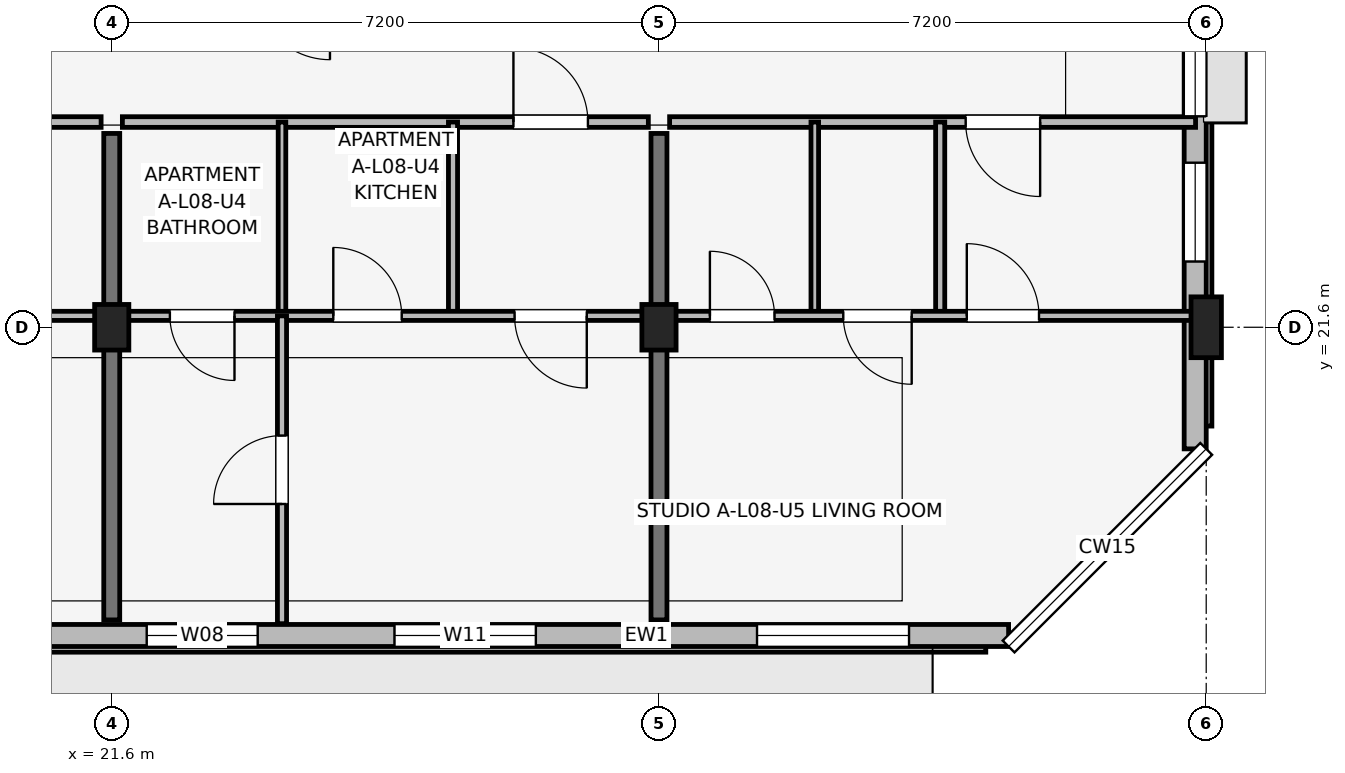
"""IFC4 building model, lengths in metres.
Left out: names, types, materials, properties, quantities, classifications, styles, units other than length and angle.
Written with IfcOpenShell. Run it as: python <this file> out.ifc"""

import sys

from ifc_helpers import new_model, si_unit, direction, frame, frame_2d, origin, origin_2d, place, context, subcontext, project, spatial, rectangle, extrude, element, fill, save


model = new_model("IFC4")
c1 = context("Model", 3, precision=1e-05, world=origin(), true_north=direction((0.0, 1.0)))
c2 = subcontext(c1, "Body", "Model", "MODEL_VIEW")
j1 = project(units=[si_unit("LENGTHUNIT", "METRE"), si_unit("PLANEANGLEUNIT", "RADIAN")], contexts=[c1])
p1 = place(None, origin())
s1 = spatial("IfcSite", under=j1, at=p1, CompositionType="ELEMENT")
p2 = place(p1, origin())
s2 = spatial("IfcBuilding", under=s1, at=p2, CompositionType="ELEMENT")
p3 = place(p2, frame((0.0, 0.0, 27.6)))
s3 = spatial("IfcBuildingStorey", under=s2, at=p3, CompositionType="ELEMENT", Elevation=27.6)
for number, where, z_axis, x_axis in (
    (1, (21.6, 21.6, 0.0), (0.0, 0.0, 1.0), (1.0, 0.0, 0.0)),
    (2, (28.8, 21.6, 0.0), (0.0, 0.0, 1.0), (1.0, 0.0, 0.0)),
):
    element("IfcColumn", number, at=place(p3, frame(where, z_axis=z_axis, x_axis=x_axis)), inside=s3, PredefinedType="COLUMN", context=c2, shape_type="SweptSolid", body=[
        extrude(rectangle(XDim=0.45, YDim=0.6, at=origin_2d()), origin(), (0.0, 0.0, 1.0), 3.15),
    ])
p4 = place(p3, frame((36.0, 21.6, 0.0), z_axis=(0.0, 0.0, 1.0), x_axis=(1.0, 0.0, 0.0)))
e3 = element("IfcColumn", 3, at=p4, inside=s3, PredefinedType="COLUMN", context=c2, shape_type="SweptSolid", body=[
    extrude(rectangle(XDim=0.4, YDim=0.8, at=origin_2d()), origin(), (0.0, 0.0, 1.0), 3.15),
])
for number, where, z_axis, x_axis in (
    (4, (21.6, 17.75, 0.0), (0.0, 0.0, 1.0), (0.0, 1.0, 0.0)),
    (5, (28.8, 17.75, 0.0), (0.0, 0.0, 1.0), (0.0, 1.0, 0.0)),
):
    element("IfcWall", number, at=place(p3, frame(where, z_axis=z_axis, x_axis=x_axis)), inside=s3, PredefinedType="SHEAR", context=c2, shape_type="SweptSolid", body=[
        extrude(rectangle(XDim=6.4, YDim=0.21, at=frame_2d((3.2, 0.0))), origin(), (0.0, 0.0, 1.0), 3.15),
    ])
p5 = place(p3, frame((2.6, 17.545, 0.0), z_axis=(0.0, 0.0, 1.0), x_axis=(1.0, 0.0, 0.0)))
e6 = element("IfcWall", 6, at=p5, inside=s3, PredefinedType="SOLIDWALL", context=c2, shape_type="SweptSolid", body=[
    extrude(rectangle(XDim=30.8, YDim=0.29, at=frame_2d((15.4, 0.0))), origin(), (0.0, 0.0, 1.0), 2.43),
])
p6 = place(p5, frame((17.95, 0.0, 0.0), z_axis=(0.0, 0.0, 1.0), x_axis=(-1.0, 0.0, 0.0)))
e7 = element("IfcOpeningElement", 7, at=p6, cuts=e6, PredefinedType="OPENING", context=c2, shape_type="SweptSolid", body=[
    extrude(rectangle(XDim=1.9, YDim=2.2, at=frame_2d((0.95, 1.1))), frame((0.0, 0.155, 0.0), z_axis=(0.0, -1.0, 0.0), x_axis=(1.0, 0.0, 0.0)), (0.0, 0.0, 1.0), 0.31),
])
p7 = place(p5, frame((0.485, 0.0, 0.67)))
e8 = element("IfcOpeningElement", 8, at=p7, cuts=e6, PredefinedType="OPENING", context=c2, shape_type="SweptSolid", body=[
    extrude(rectangle(XDim=2.0, YDim=1.65, at=frame_2d((1.0, 0.825))), frame((0.0, 0.155, 0.0), z_axis=(0.0, -1.0, 0.0), x_axis=(1.0, 0.0, 0.0)), (0.0, 0.0, 1.0), 0.31),
])
p8 = place(p5, frame((3.145, 0.0, 0.75)))
e9 = element("IfcOpeningElement", 9, at=p8, cuts=e6, PredefinedType="OPENING", context=c2, shape_type="SweptSolid", body=[
    extrude(rectangle(XDim=0.98, YDim=1.45, at=frame_2d((0.49, 0.725))), frame((0.0, 0.155, 0.0), z_axis=(0.0, -1.0, 0.0), x_axis=(1.0, 0.0, 0.0)), (0.0, 0.0, 1.0), 0.31),
])
p9 = place(p5, frame((5.115, 0.0, 0.75)))
e10 = element("IfcOpeningElement", 10, at=p9, cuts=e6, PredefinedType="OPENING", context=c2, shape_type="SweptSolid", body=[
    extrude(rectangle(XDim=1.1, YDim=1.5, at=frame_2d((0.55, 0.75))), frame((0.0, 0.155, 0.0), z_axis=(0.0, -1.0, 0.0), x_axis=(1.0, 0.0, 0.0)), (0.0, 0.0, 1.0), 0.31),
])
p10 = place(p5, frame((7.9, 0.0, 0.67)))
e11 = element("IfcOpeningElement", 11, at=p10, cuts=e6, PredefinedType="OPENING", context=c2, shape_type="SweptSolid", body=[
    extrude(rectangle(XDim=2.45, YDim=1.65, at=frame_2d((1.225, 0.825))), frame((0.0, 0.155, 0.0), z_axis=(0.0, -1.0, 0.0), x_axis=(1.0, 0.0, 0.0)), (0.0, 0.0, 1.0), 0.31),
])
p11 = place(p5, frame((12.32, 0.0, 0.75)))
e12 = element("IfcOpeningElement", 12, at=p11, cuts=e6, PredefinedType="OPENING", context=c2, shape_type="SweptSolid", body=[
    extrude(rectangle(XDim=1.34, YDim=1.55, at=frame_2d((0.67, 0.775))), frame((0.0, 0.155, 0.0), z_axis=(0.0, -1.0, 0.0), x_axis=(1.0, 0.0, 0.0)), (0.0, 0.0, 1.0), 0.31),
])
p12 = place(p5, frame((19.46, 0.0, 0.75)))
e13 = element("IfcOpeningElement", 13, at=p12, cuts=e6, PredefinedType="OPENING", context=c2, shape_type="SweptSolid", body=[
    extrude(rectangle(XDim=1.46, YDim=1.55, at=frame_2d((0.73, 0.775))), frame((0.0, 0.155, 0.0), z_axis=(0.0, -1.0, 0.0), x_axis=(1.0, 0.0, 0.0)), (0.0, 0.0, 1.0), 0.31),
])
p13 = place(p5, frame((22.72, 0.0, 0.7)))
e14 = element("IfcOpeningElement", 14, at=p13, cuts=e6, PredefinedType="OPENING", context=c2, shape_type="SweptSolid", body=[
    extrude(rectangle(XDim=1.86, YDim=1.6, at=frame_2d((0.93, 0.8))), frame((0.0, 0.155, 0.0), z_axis=(0.0, -1.0, 0.0), x_axis=(1.0, 0.0, 0.0)), (0.0, 0.0, 1.0), 0.31),
])
p14 = place(p5, frame((27.49, 0.0, 0.67)))
e15 = element("IfcOpeningElement", 15, at=p14, cuts=e6, PredefinedType="OPENING", context=c2, shape_type="SweptSolid", body=[
    extrude(rectangle(XDim=2.0, YDim=1.65, at=frame_2d((1.0, 0.825))), frame((0.0, 0.155, 0.0), z_axis=(0.0, -1.0, 0.0), x_axis=(1.0, 0.0, 0.0)), (0.0, 0.0, 1.0), 0.31),
])
p15 = place(p3, frame((35.855, 20.0, 0.0), z_axis=(0.0, 0.0, 1.0), x_axis=(0.0, 1.0, 0.0)))
e16 = element("IfcWall", 16, at=p15, inside=s3, PredefinedType="SOLIDWALL", context=c2, shape_type="SweptSolid", body=[
    extrude(rectangle(XDim=13.4, YDim=0.29, at=frame_2d((6.7, 0.0))), origin(), (0.0, 0.0, 1.0), 2.43),
])
p16 = place(p15, frame((4.375, 0.0, 1.05)))
e17 = element("IfcOpeningElement", 17, at=p16, cuts=e16, PredefinedType="OPENING", context=c2, shape_type="SweptSolid", body=[
    extrude(rectangle(XDim=1.65, YDim=1.15, at=frame_2d((0.825, 0.575))), frame((0.0, 0.155, 0.0), z_axis=(0.0, -1.0, 0.0), x_axis=(1.0, 0.0, 0.0)), (0.0, 0.0, 1.0), 0.31),
])
p17 = place(p15, frame((2.465, 0.0, 0.75)))
e18 = element("IfcOpeningElement", 18, at=p17, cuts=e16, PredefinedType="OPENING", context=c2, shape_type="SweptSolid", body=[
    extrude(rectangle(XDim=1.3, YDim=1.55, at=frame_2d((0.65, 0.775))), frame((0.0, 0.155, 0.0), z_axis=(0.0, -1.0, 0.0), x_axis=(1.0, 0.0, 0.0)), (0.0, 0.0, 1.0), 0.31),
])
p18 = place(p3, frame((14.54, 24.3, 0.0), z_axis=(0.0, 0.0, 1.0), x_axis=(1.0, 0.0, 0.0)))
e19 = element("IfcWall", 19, at=p18, inside=s3, PredefinedType="PARTITIONING", context=c2, shape_type="SweptSolid", body=[
    extrude(rectangle(XDim=6.92, YDim=0.14, at=frame_2d((3.46, 0.0))), origin(), (0.0, 0.0, 1.0), 2.38),
])
p19 = place(p18, frame((5.975, 0.0, 0.0), z_axis=(0.0, 0.0, 1.0), x_axis=(-1.0, 0.0, 0.0)))
e20 = element("IfcOpeningElement", 20, at=p19, cuts=e19, PredefinedType="OPENING", context=c2, shape_type="SweptSolid", body=[
    extrude(rectangle(XDim=0.98, YDim=2.1, at=frame_2d((0.49, 1.05))), frame((0.0, 0.08, 0.0), z_axis=(0.0, -1.0, 0.0), x_axis=(1.0, 0.0, 0.0)), (0.0, 0.0, 1.0), 0.16),
])
p20 = place(p3, frame((14.54, 21.75, 0.0), z_axis=(0.0, 0.0, 1.0), x_axis=(1.0, 0.0, 0.0)))
e21 = element("IfcWall", 21, at=p20, inside=s3, PredefinedType="PARTITIONING", context=c2, shape_type="SweptSolid", body=[
    extrude(rectangle(XDim=6.92, YDim=0.12, at=frame_2d((3.46, 0.0))), origin(), (0.0, 0.0, 1.0), 2.38),
])
p21 = place(p20, frame((0.625, 0.0, 0.0)))
e22 = element("IfcOpeningElement", 22, at=p21, cuts=e21, PredefinedType="OPENING", context=c2, shape_type="SweptSolid", body=[
    extrude(rectangle(XDim=0.85, YDim=2.08, at=frame_2d((0.425, 1.04))), frame((0.0, 0.07, 0.0), z_axis=(0.0, -1.0, 0.0), x_axis=(1.0, 0.0, 0.0)), (0.0, 0.0, 1.0), 0.14),
])
p22 = place(p20, frame((3.525, 0.0, 0.0), z_axis=(0.0, 0.0, 1.0), x_axis=(-1.0, 0.0, 0.0)))
e23 = element("IfcOpeningElement", 23, at=p22, cuts=e21, PredefinedType="OPENING", context=c2, shape_type="SweptSolid", body=[
    extrude(rectangle(XDim=0.9, YDim=2.08, at=frame_2d((0.45, 1.04))), frame((0.0, 0.07, 0.0), z_axis=(0.0, -1.0, 0.0), x_axis=(1.0, 0.0, 0.0)), (0.0, 0.0, 1.0), 0.14),
])
p23 = place(p20, frame((5.01, 0.0, 0.0)))
e24 = element("IfcOpeningElement", 24, at=p23, cuts=e21, PredefinedType="OPENING", context=c2, shape_type="SweptSolid", body=[
    extrude(rectangle(XDim=0.95, YDim=2.08, at=frame_2d((0.475, 1.04))), frame((0.0, 0.07, 0.0), z_axis=(0.0, -1.0, 0.0), x_axis=(1.0, 0.0, 0.0)), (0.0, 0.0, 1.0), 0.14),
])
p24 = place(p3, frame((21.74, 24.3, 0.0), z_axis=(0.0, 0.0, 1.0), x_axis=(1.0, 0.0, 0.0)))
e25 = element("IfcWall", 25, at=p24, inside=s3, PredefinedType="PARTITIONING", context=c2, shape_type="SweptSolid", body=[
    extrude(rectangle(XDim=6.92, YDim=0.14, at=frame_2d((3.46, 0.0))), origin(), (0.0, 0.0, 1.0), 2.38),
])
p25 = place(p24, frame((5.145, 0.0, 0.0)))
e26 = element("IfcOpeningElement", 26, at=p25, cuts=e25, PredefinedType="OPENING", context=c2, shape_type="SweptSolid", body=[
    extrude(rectangle(XDim=0.98, YDim=2.1, at=frame_2d((0.49, 1.05))), frame((0.0, 0.08, 0.0), z_axis=(0.0, -1.0, 0.0), x_axis=(1.0, 0.0, 0.0)), (0.0, 0.0, 1.0), 0.16),
])
p26 = place(p3, frame((23.84, 21.75, 0.0), z_axis=(0.0, 0.0, 1.0), x_axis=(0.0, 1.0, 0.0)))
e27 = element("IfcWall", 27, at=p26, inside=s3, PredefinedType="PARTITIONING", context=c2, shape_type="SweptSolid", body=[
    extrude(rectangle(XDim=2.55, YDim=0.1, at=frame_2d((1.275, 0.0))), origin(), (0.0, 0.0, 1.0), 2.38),
])
p27 = place(p3, frame((26.09, 21.75, 0.0), z_axis=(0.0, 0.0, 1.0), x_axis=(0.0, 1.0, 0.0)))
e28 = element("IfcWall", 28, at=p27, inside=s3, PredefinedType="PARTITIONING", context=c2, shape_type="SweptSolid", body=[
    extrude(rectangle(XDim=2.55, YDim=0.12, at=frame_2d((1.275, 0.0))), origin(), (0.0, 0.0, 1.0), 2.38),
])
p28 = place(p3, frame((21.74, 21.75, 0.0), z_axis=(0.0, 0.0, 1.0), x_axis=(1.0, 0.0, 0.0)))
e29 = element("IfcWall", 29, at=p28, inside=s3, PredefinedType="PARTITIONING", context=c2, shape_type="SweptSolid", body=[
    extrude(rectangle(XDim=6.92, YDim=0.12, at=frame_2d((3.46, 0.0))), origin(), (0.0, 0.0, 1.0), 2.38),
])
p29 = place(p28, frame((1.475, 0.0, 0.0), z_axis=(0.0, 0.0, 1.0), x_axis=(-1.0, 0.0, 0.0)))
e30 = element("IfcOpeningElement", 30, at=p29, cuts=e29, PredefinedType="OPENING", context=c2, shape_type="SweptSolid", body=[
    extrude(rectangle(XDim=0.85, YDim=2.08, at=frame_2d((0.425, 1.04))), frame((0.0, 0.07, 0.0), z_axis=(0.0, -1.0, 0.0), x_axis=(1.0, 0.0, 0.0)), (0.0, 0.0, 1.0), 0.14),
])
p30 = place(p28, frame((2.775, 0.0, 0.0)))
e31 = element("IfcOpeningElement", 31, at=p30, cuts=e29, PredefinedType="OPENING", context=c2, shape_type="SweptSolid", body=[
    extrude(rectangle(XDim=0.9, YDim=2.08, at=frame_2d((0.45, 1.04))), frame((0.0, 0.07, 0.0), z_axis=(0.0, -1.0, 0.0), x_axis=(1.0, 0.0, 0.0)), (0.0, 0.0, 1.0), 0.14),
])
p31 = place(p28, frame((6.11, 0.0, 0.0), z_axis=(0.0, 0.0, 1.0), x_axis=(-1.0, 0.0, 0.0)))
e32 = element("IfcOpeningElement", 32, at=p31, cuts=e29, PredefinedType="OPENING", context=c2, shape_type="SweptSolid", body=[
    extrude(rectangle(XDim=0.95, YDim=2.08, at=frame_2d((0.475, 1.04))), frame((0.0, 0.07, 0.0), z_axis=(0.0, -1.0, 0.0), x_axis=(1.0, 0.0, 0.0)), (0.0, 0.0, 1.0), 0.14),
])
p32 = place(p3, frame((23.84, 17.7, 0.0), z_axis=(0.0, 0.0, 1.0), x_axis=(0.0, 1.0, 0.0)))
e33 = element("IfcWall", 33, at=p32, inside=s3, PredefinedType="PARTITIONING", context=c2, shape_type="SweptSolid", body=[
    extrude(rectangle(XDim=4.05, YDim=0.12, at=frame_2d((2.025, 0.0))), origin(), (0.0, 0.0, 1.0), 2.38),
])
p33 = place(p32, frame((1.575, 0.0, 0.0)))
e34 = element("IfcOpeningElement", 34, at=p33, cuts=e33, PredefinedType="OPENING", context=c2, shape_type="SweptSolid", body=[
    extrude(rectangle(XDim=0.9, YDim=2.08, at=frame_2d((0.45, 1.04))), frame((0.0, 0.07, 0.0), z_axis=(0.0, -1.0, 0.0), x_axis=(1.0, 0.0, 0.0)), (0.0, 0.0, 1.0), 0.14),
])
p34 = place(p3, frame((28.94, 24.3, 0.0), z_axis=(0.0, 0.0, 1.0), x_axis=(1.0, 0.0, 0.0)))
e35 = element("IfcWall", 35, at=p34, inside=s3, PredefinedType="PARTITIONING", context=c2, shape_type="SweptSolid", body=[
    extrude(rectangle(XDim=6.92, YDim=0.14, at=frame_2d((3.46, 0.0))), origin(), (0.0, 0.0, 1.0), 2.38),
])
p35 = place(p34, frame((4.875, 0.0, 0.0), z_axis=(0.0, 0.0, 1.0), x_axis=(-1.0, 0.0, 0.0)))
e36 = element("IfcOpeningElement", 36, at=p35, cuts=e35, PredefinedType="OPENING", context=c2, shape_type="SweptSolid", body=[
    extrude(rectangle(XDim=0.98, YDim=2.1, at=frame_2d((0.49, 1.05))), frame((0.0, 0.08, 0.0), z_axis=(0.0, -1.0, 0.0), x_axis=(1.0, 0.0, 0.0)), (0.0, 0.0, 1.0), 0.16),
])
p36 = place(p3, frame((30.85, 21.75, 0.0), z_axis=(0.0, 0.0, 1.0), x_axis=(0.0, 1.0, 0.0)))
e37 = element("IfcWall", 37, at=p36, inside=s3, PredefinedType="PARTITIONING", context=c2, shape_type="SweptSolid", body=[
    extrude(rectangle(XDim=2.55, YDim=0.1, at=frame_2d((1.275, 0.0))), origin(), (0.0, 0.0, 1.0), 2.38),
])
p37 = place(p3, frame((32.5, 21.75, 0.0), z_axis=(0.0, 0.0, 1.0), x_axis=(0.0, 1.0, 0.0)))
e38 = element("IfcWall", 38, at=p37, inside=s3, PredefinedType="PARTITIONING", context=c2, shape_type="SweptSolid", body=[
    extrude(rectangle(XDim=2.55, YDim=0.12, at=frame_2d((1.275, 0.0))), origin(), (0.0, 0.0, 1.0), 2.38),
])
p38 = place(p3, frame((28.94, 21.75, 0.0), z_axis=(0.0, 0.0, 1.0), x_axis=(1.0, 0.0, 0.0)))
e39 = element("IfcWall", 39, at=p38, inside=s3, PredefinedType="PARTITIONING", context=c2, shape_type="SweptSolid", body=[
    extrude(rectangle(XDim=6.92, YDim=0.12, at=frame_2d((3.46, 0.0))), origin(), (0.0, 0.0, 1.0), 2.38),
])
p39 = place(p38, frame((0.53, 0.0, 0.0)))
e40 = element("IfcOpeningElement", 40, at=p39, cuts=e39, PredefinedType="OPENING", context=c2, shape_type="SweptSolid", body=[
    extrude(rectangle(XDim=0.85, YDim=2.08, at=frame_2d((0.425, 1.04))), frame((0.0, 0.07, 0.0), z_axis=(0.0, -1.0, 0.0), x_axis=(1.0, 0.0, 0.0)), (0.0, 0.0, 1.0), 0.14),
])
p40 = place(p38, frame((3.185, 0.0, 0.0), z_axis=(0.0, 0.0, 1.0), x_axis=(-1.0, 0.0, 0.0)))
e41 = element("IfcOpeningElement", 41, at=p40, cuts=e39, PredefinedType="OPENING", context=c2, shape_type="SweptSolid", body=[
    extrude(rectangle(XDim=0.9, YDim=2.08, at=frame_2d((0.45, 1.04))), frame((0.0, 0.07, 0.0), z_axis=(0.0, -1.0, 0.0), x_axis=(1.0, 0.0, 0.0)), (0.0, 0.0, 1.0), 0.14),
])
p41 = place(p38, frame((3.91, 0.0, 0.0)))
e42 = element("IfcOpeningElement", 42, at=p41, cuts=e39, PredefinedType="OPENING", context=c2, shape_type="SweptSolid", body=[
    extrude(rectangle(XDim=0.95, YDim=2.08, at=frame_2d((0.475, 1.04))), frame((0.0, 0.07, 0.0), z_axis=(0.0, -1.0, 0.0), x_axis=(1.0, 0.0, 0.0)), (0.0, 0.0, 1.0), 0.14),
])
p42 = place(p12, origin())
e43 = element("IfcWindow", 43, at=p42, inside=s3, PartitioningType="SINGLE_PANEL", PredefinedType="WINDOW", context=c2, shape_type="SweptSolid", body=[
    extrude(rectangle(XDim=1.46, YDim=1.55, at=frame_2d((0.73, 0.775))), frame((0.0, 0.03, 0.0), z_axis=(0.0, -1.0, 0.0), x_axis=(1.0, 0.0, 0.0)), (0.0, 0.0, 1.0), 0.06),
])
fill(e13, e43)
p43 = place(p13, origin())
e44 = element("IfcWindow", 44, at=p43, inside=s3, PartitioningType="SINGLE_PANEL", PredefinedType="WINDOW", context=c2, shape_type="SweptSolid", body=[
    extrude(rectangle(XDim=1.86, YDim=1.6, at=frame_2d((0.93, 0.8))), frame((0.0, 0.03, 0.0), z_axis=(0.0, -1.0, 0.0), x_axis=(1.0, 0.0, 0.0)), (0.0, 0.0, 1.0), 0.06),
])
fill(e14, e44)
p44 = place(p14, origin())
e45 = element("IfcWindow", 45, at=p44, inside=s3, PartitioningType="SINGLE_PANEL", PredefinedType="WINDOW", context=c2, shape_type="SweptSolid", body=[
    extrude(rectangle(XDim=2.0, YDim=1.65, at=frame_2d((1.0, 0.825))), frame((0.0, 0.03, 0.0), z_axis=(0.0, -1.0, 0.0), x_axis=(1.0, 0.0, 0.0)), (0.0, 0.0, 1.0), 0.06),
])
fill(e15, e45)
p45 = place(p16, origin())
e46 = element("IfcWindow", 46, at=p45, inside=s3, PartitioningType="SINGLE_PANEL", PredefinedType="WINDOW", context=c2, shape_type="SweptSolid", body=[
    extrude(rectangle(XDim=1.65, YDim=1.15, at=frame_2d((0.825, 0.575))), frame((0.0, 0.03, 0.0), z_axis=(0.0, -1.0, 0.0), x_axis=(1.0, 0.0, 0.0)), (0.0, 0.0, 1.0), 0.06),
])
fill(e17, e46)
p46 = place(p17, origin())
e47 = element("IfcWindow", 47, at=p46, inside=s3, PartitioningType="SINGLE_PANEL", PredefinedType="WINDOW", context=c2, shape_type="SweptSolid", body=[
    extrude(rectangle(XDim=1.3, YDim=1.55, at=frame_2d((0.65, 0.775))), frame((0.0, 0.03, 0.0), z_axis=(0.0, -1.0, 0.0), x_axis=(1.0, 0.0, 0.0)), (0.0, 0.0, 1.0), 0.06),
])
fill(e18, e47)
p47 = place(p25, origin())
e48 = element("IfcDoor", 48, at=p47, inside=s3, OperationType="SINGLE_SWING_LEFT", PredefinedType="DOOR", context=c2, shape_type="SweptSolid", body=[
    extrude(rectangle(XDim=0.98, YDim=2.1, at=frame_2d((0.49, 1.05))), frame((0.0, 0.025, 0.0), z_axis=(0.0, -1.0, 0.0), x_axis=(1.0, 0.0, 0.0)), (0.0, 0.0, 1.0), 0.05),
])
fill(e26, e48)
p48 = place(p29, origin())
e49 = element("IfcDoor", 49, at=p48, inside=s3, OperationType="SINGLE_SWING_RIGHT", PredefinedType="DOOR", context=c2, shape_type="SweptSolid", body=[
    extrude(rectangle(XDim=0.85, YDim=2.08, at=frame_2d((0.425, 1.04))), frame((0.0, 0.025, 0.0), z_axis=(0.0, -1.0, 0.0), x_axis=(1.0, 0.0, 0.0)), (0.0, 0.0, 1.0), 0.05),
])
fill(e30, e49)
p49 = place(p30, origin())
e50 = element("IfcDoor", 50, at=p49, inside=s3, OperationType="SINGLE_SWING_LEFT", PredefinedType="DOOR", context=c2, shape_type="SweptSolid", body=[
    extrude(rectangle(XDim=0.9, YDim=2.08, at=frame_2d((0.45, 1.04))), frame((0.0, 0.025, 0.0), z_axis=(0.0, -1.0, 0.0), x_axis=(1.0, 0.0, 0.0)), (0.0, 0.0, 1.0), 0.05),
])
fill(e31, e50)
p50 = place(p31, origin())
e51 = element("IfcDoor", 51, at=p50, inside=s3, OperationType="SINGLE_SWING_RIGHT", PredefinedType="DOOR", context=c2, shape_type="SweptSolid", body=[
    extrude(rectangle(XDim=0.95, YDim=2.08, at=frame_2d((0.475, 1.04))), frame((0.0, 0.025, 0.0), z_axis=(0.0, -1.0, 0.0), x_axis=(1.0, 0.0, 0.0)), (0.0, 0.0, 1.0), 0.05),
])
fill(e32, e51)
p51 = place(p33, origin())
e52 = element("IfcDoor", 52, at=p51, inside=s3, OperationType="SINGLE_SWING_LEFT", PredefinedType="DOOR", context=c2, shape_type="SweptSolid", body=[
    extrude(rectangle(XDim=0.9, YDim=2.08, at=frame_2d((0.45, 1.04))), frame((0.0, 0.025, 0.0), z_axis=(0.0, -1.0, 0.0), x_axis=(1.0, 0.0, 0.0)), (0.0, 0.0, 1.0), 0.05),
])
fill(e34, e52)
p52 = place(p35, origin())
e53 = element("IfcDoor", 53, at=p52, inside=s3, OperationType="SINGLE_SWING_RIGHT", PredefinedType="DOOR", context=c2, shape_type="SweptSolid", body=[
    extrude(rectangle(XDim=0.98, YDim=2.1, at=frame_2d((0.49, 1.05))), frame((0.0, 0.025, 0.0), z_axis=(0.0, -1.0, 0.0), x_axis=(1.0, 0.0, 0.0)), (0.0, 0.0, 1.0), 0.05),
])
fill(e36, e53)
p53 = place(p39, origin())
e54 = element("IfcDoor", 54, at=p53, inside=s3, OperationType="SINGLE_SWING_LEFT", PredefinedType="DOOR", context=c2, shape_type="SweptSolid", body=[
    extrude(rectangle(XDim=0.85, YDim=2.08, at=frame_2d((0.425, 1.04))), frame((0.0, 0.025, 0.0), z_axis=(0.0, -1.0, 0.0), x_axis=(1.0, 0.0, 0.0)), (0.0, 0.0, 1.0), 0.05),
])
fill(e40, e54)
p54 = place(p40, origin())
e55 = element("IfcDoor", 55, at=p54, inside=s3, OperationType="SINGLE_SWING_RIGHT", PredefinedType="DOOR", context=c2, shape_type="SweptSolid", body=[
    extrude(rectangle(XDim=0.9, YDim=2.08, at=frame_2d((0.45, 1.04))), frame((0.0, 0.025, 0.0), z_axis=(0.0, -1.0, 0.0), x_axis=(1.0, 0.0, 0.0)), (0.0, 0.0, 1.0), 0.05),
])
fill(e41, e55)
p55 = place(p41, origin())
e56 = element("IfcDoor", 56, at=p55, inside=s3, OperationType="SINGLE_SWING_LEFT", PredefinedType="DOOR", context=c2, shape_type="SweptSolid", body=[
    extrude(rectangle(XDim=0.95, YDim=2.08, at=frame_2d((0.475, 1.04))), frame((0.0, 0.025, 0.0), z_axis=(0.0, -1.0, 0.0), x_axis=(1.0, 0.0, 0.0)), (0.0, 0.0, 1.0), 0.05),
])
fill(e42, e56)
save(model, sys.argv[1])
